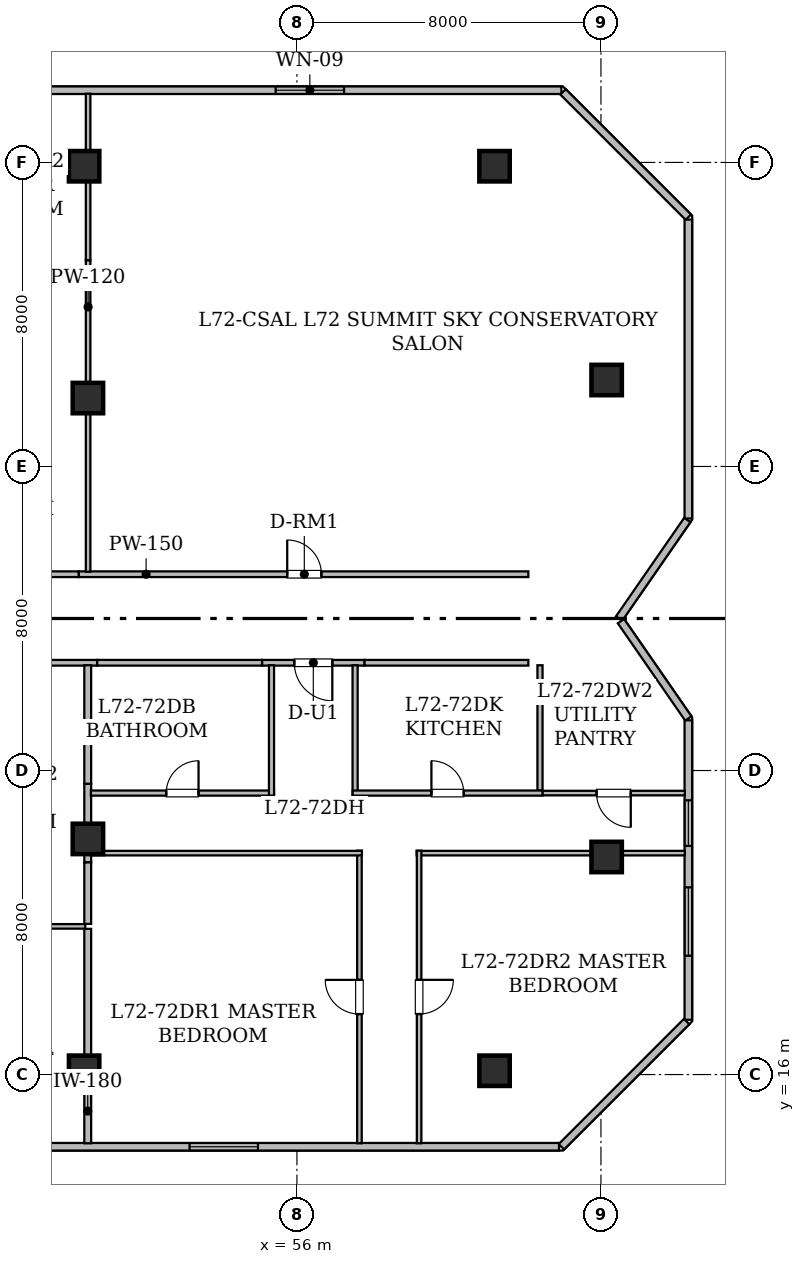
"""IFC4 building model, lengths in metres.
Left out: names, types, materials, properties, quantities, classifications, styles, units other than length and angle.
Written with IfcOpenShell. Run it as: python <this file> out.ifc"""

import sys

from ifc_helpers import new_model, si_unit, direction, frame, frame_2d, origin, origin_2d, place, context, subcontext, project, spatial, rectangle, hollow_rectangle, extrude, element, fill, save


model = new_model("IFC4")
c1 = context("Model", 3, precision=1e-05, world=origin(), true_north=direction((0.0, 1.0)))
c2 = subcontext(c1, "Body", "Model", "MODEL_VIEW")
j1 = project(units=[si_unit("LENGTHUNIT", "METRE"), si_unit("PLANEANGLEUNIT", "RADIAN")], contexts=[c1])
p1 = place(None, origin())
s1 = spatial("IfcSite", under=j1, at=p1, CompositionType="ELEMENT")
p2 = place(p1, origin())
s2 = spatial("IfcBuilding", under=s1, at=p2, CompositionType="ELEMENT")
p3 = place(p2, frame((0.0, 0.0, 282.05)))
s3 = spatial("IfcBuildingStorey", under=s2, at=p3, CompositionType="ELEMENT", Elevation=282.05)
for number, where, z_axis, x_axis in (
    (1, (50.4, 16.1, 0.0), (0.0, 0.0, 1.0), (1.0, 0.0, 0.0)),
    (2, (61.2, 16.1, 0.0), (0.0, 0.0, 1.0), (1.0, 0.0, 0.0)),
    (3, (50.4, 39.9, 0.0), (0.0, 0.0, 1.0), (1.0, 0.0, 0.0)),
    (4, (61.2, 39.9, 0.0), (0.0, 0.0, 1.0), (1.0, 0.0, 0.0)),
    (5, (64.15, 21.725, 0.0), (0.0, 0.0, 1.0), (1.0, 0.0, 0.0)),
    (6, (64.15, 34.275, 0.0), (0.0, 0.0, 1.0), (1.0, 0.0, 0.0)),
):
    element("IfcColumn", number, at=place(p3, frame(where, z_axis=z_axis, x_axis=x_axis)), inside=s3, PredefinedType="COLUMN", context=c2, shape_type="SweptSolid", body=[
        extrude(hollow_rectangle(XDim=0.8, YDim=0.8, WallThickness=0.04, at=origin_2d()), origin(), (0.0, 0.0, 1.0), 4.175),
    ])
for number, where, z_axis, x_axis in (
    (7, (50.5, 22.2, 0.0), (0.0, 0.0, 1.0), (1.0, 0.0, 0.0)),
    (8, (50.5, 33.8, 0.0), (0.0, 0.0, 1.0), (1.0, 0.0, 0.0)),
):
    element("IfcColumn", number, at=place(p3, frame(where, z_axis=z_axis, x_axis=x_axis)), inside=s3, PredefinedType="COLUMN", context=c2, shape_type="SweptSolid", body=[
        extrude(hollow_rectangle(XDim=0.8, YDim=0.8, WallThickness=0.04, at=origin_2d()), origin(), (0.0, 0.0, 1.0), 4.2),
    ])
p4 = place(p3, frame((27.102, 41.9, 0.0), z_axis=(0.0, 0.0, 1.0), x_axis=(1.0, 0.0, 0.0)))
e9 = element("IfcWall", 9, at=p4, inside=s3, PredefinedType="STANDARD", context=c2, shape_type="SweptSolid", body=[
    extrude(rectangle(XDim=35.857, YDim=0.2, at=frame_2d((17.928, 0.0))), origin(), (0.0, 0.0, 1.0), 3.78),
])
p5 = place(p4, frame((28.338, 0.0, 0.85)))
e10 = element("IfcOpeningElement", 10, at=p5, cuts=e9, PredefinedType="OPENING", context=c2, shape_type="SweptSolid", body=[
    extrude(rectangle(XDim=1.8, YDim=0.92, at=frame_2d((0.9, 0.46))), frame((0.0, 0.11, 0.0), z_axis=(0.0, -1.0, 0.0), x_axis=(1.0, 0.0, 0.0)), (0.0, 0.0, 1.0), 0.22),
])
p6 = place(p4, frame((17.233, 0.0, 0.78)))
e11 = element("IfcOpeningElement", 11, at=p6, cuts=e9, PredefinedType="OPENING", context=c2, shape_type="SweptSolid", body=[
    extrude(rectangle(XDim=1.2, YDim=1.5, at=frame_2d((0.6, 0.75))), frame((0.0, 0.11, 0.0), z_axis=(0.0, -1.0, 0.0), x_axis=(1.0, 0.0, 0.0)), (0.0, 0.0, 1.0), 0.22),
])
p7 = place(p4, frame((20.108, 0.0, 0.85)))
e12 = element("IfcOpeningElement", 12, at=p7, cuts=e9, PredefinedType="OPENING", context=c2, shape_type="SweptSolid", body=[
    extrude(rectangle(XDim=1.8, YDim=0.92, at=frame_2d((0.9, 0.46))), frame((0.0, 0.11, 0.0), z_axis=(0.0, -1.0, 0.0), x_axis=(1.0, 0.0, 0.0)), (0.0, 0.0, 1.0), 0.22),
])
p8 = place(p3, frame((63.002, 41.857, 0.0), z_axis=(0.0, 0.0, 1.0), x_axis=(0.707132953363, -0.707080608041, 0.0)))
e13 = element("IfcWall", 13, at=p8, inside=s3, PredefinedType="STANDARD", context=c2, shape_type="SweptSolid", body=[
    extrude(rectangle(XDim=4.664, YDim=0.2, at=frame_2d((2.332, 0.0))), origin(), (0.0, 0.0, 1.0), 3.78),
])
p9 = place(p3, frame((66.3, 38.496, 0.0), z_axis=(0.0, 0.0, 1.0), x_axis=(0.0, -1.0, 0.0)))
e14 = element("IfcWall", 14, at=p9, inside=s3, PredefinedType="STANDARD", context=c2, shape_type="SweptSolid", body=[
    extrude(rectangle(XDim=7.865, YDim=0.2, at=frame_2d((3.933, 0.0))), origin(), (0.0, 0.0, 1.0), 3.78),
])
p10 = place(p3, frame((66.273, 30.592, 0.0), z_axis=(0.0, 0.0, 1.0), x_axis=(-0.569302587555, -0.822128070195, 0.0)))
e15 = element("IfcWall", 15, at=p10, inside=s3, PredefinedType="STANDARD", context=c2, shape_type="SweptSolid", body=[
    extrude(rectangle(XDim=3.153, YDim=0.2, at=frame_2d((1.576, 0.0))), origin(), (0.0, 0.0, 1.0), 3.78),
])
p11 = place(p3, frame((64.526, 27.931, 0.0), z_axis=(0.0, 0.0, 1.0), x_axis=(0.569311819154, -0.822121677473, 0.0)))
e16 = element("IfcWall", 16, at=p11, inside=s3, PredefinedType="STANDARD", context=c2, shape_type="SweptSolid", body=[
    extrude(rectangle(XDim=3.116, YDim=0.2, at=frame_2d((1.558, 0.0))), origin(), (0.0, 0.0, 1.0), 3.78),
])
p12 = place(p3, frame((66.3, 25.321, 0.0), z_axis=(0.0, 0.0, 1.0), x_axis=(0.0, -1.0, 0.0)))
e17 = element("IfcWall", 17, at=p12, inside=s3, PredefinedType="STANDARD", context=c2, shape_type="SweptSolid", body=[
    extrude(rectangle(XDim=7.88, YDim=0.2, at=frame_2d((3.94, 0.0))), origin(), (0.0, 0.0, 1.0), 3.78),
])
p13 = place(p12, frame((2.105, 0.0, 0.78)))
e18 = element("IfcOpeningElement", 18, at=p13, cuts=e17, PredefinedType="OPENING", context=c2, shape_type="SweptSolid", body=[
    extrude(rectangle(XDim=1.2, YDim=1.5, at=frame_2d((0.6, 0.75))), frame((0.0, 0.11, 0.0), z_axis=(0.0, -1.0, 0.0), x_axis=(1.0, 0.0, 0.0)), (0.0, 0.0, 1.0), 0.22),
])
p14 = place(p12, frame((4.395, 0.0, 0.85)))
e19 = element("IfcOpeningElement", 19, at=p14, cuts=e17, PredefinedType="OPENING", context=c2, shape_type="SweptSolid", body=[
    extrude(rectangle(XDim=1.8, YDim=0.92, at=frame_2d((0.9, 0.46))), frame((0.0, 0.11, 0.0), z_axis=(0.0, -1.0, 0.0), x_axis=(1.0, 0.0, 0.0)), (0.0, 0.0, 1.0), 0.22),
])
p15 = place(p3, frame((66.255, 17.396, 0.0), z_axis=(0.0, 0.0, 1.0), x_axis=(-0.707106781187, -0.707106781187, 0.0)))
e20 = element("IfcWall", 20, at=p15, inside=s3, PredefinedType="STANDARD", context=c2, shape_type="SweptSolid", body=[
    extrude(rectangle(XDim=4.661, YDim=0.2, at=frame_2d((2.331, 0.0))), origin(), (0.0, 0.0, 1.0), 3.78),
])
p16 = place(p3, frame((62.896, 14.1, 0.0), z_axis=(0.0, 0.0, 1.0), x_axis=(-1.0, 0.0, 0.0)))
e21 = element("IfcWall", 21, at=p16, inside=s3, PredefinedType="STANDARD", context=c2, shape_type="SweptSolid", body=[
    extrude(rectangle(XDim=35.793, YDim=0.2, at=frame_2d((17.896, 0.0))), origin(), (0.0, 0.0, 1.0), 3.78),
])
p17 = place(p16, frame((17.361, 0.0, 0.78)))
e22 = element("IfcOpeningElement", 22, at=p17, cuts=e21, PredefinedType="OPENING", context=c2, shape_type="SweptSolid", body=[
    extrude(rectangle(XDim=1.2, YDim=1.5, at=frame_2d((0.6, 0.75))), frame((0.0, 0.11, 0.0), z_axis=(0.0, -1.0, 0.0), x_axis=(1.0, 0.0, 0.0)), (0.0, 0.0, 1.0), 0.22),
])
p18 = place(p16, frame((13.886, 0.0, 0.85)))
e23 = element("IfcOpeningElement", 23, at=p18, cuts=e21, PredefinedType="OPENING", context=c2, shape_type="SweptSolid", body=[
    extrude(rectangle(XDim=1.8, YDim=0.92, at=frame_2d((0.9, 0.46))), frame((0.0, 0.11, 0.0), z_axis=(0.0, -1.0, 0.0), x_axis=(1.0, 0.0, 0.0)), (0.0, 0.0, 1.0), 0.22),
])
p19 = place(p16, frame((7.921, 0.0, 0.85)))
e24 = element("IfcOpeningElement", 24, at=p19, cuts=e21, PredefinedType="OPENING", context=c2, shape_type="SweptSolid", body=[
    extrude(rectangle(XDim=1.8, YDim=0.92, at=frame_2d((0.9, 0.46))), frame((0.0, 0.11, 0.0), z_axis=(0.0, -1.0, 0.0), x_axis=(1.0, 0.0, 0.0)), (0.0, 0.0, 1.0), 0.22),
])
p20 = place(p3, frame((50.256, 29.165, 0.0), z_axis=(0.0, 0.0, 1.0), x_axis=(1.0, 0.0, 0.0)))
e25 = element("IfcWall", 25, at=p20, inside=s3, PredefinedType="STANDARD", context=c2, shape_type="SweptSolid", body=[
    extrude(rectangle(XDim=11.834, YDim=0.15, at=frame_2d((5.917, 0.0))), origin(), (0.0, 0.0, 1.0), 2.22),
])
p21 = place(p20, frame((5.488, 0.0, 0.0)))
e26 = element("IfcOpeningElement", 26, at=p21, cuts=e25, PredefinedType="OPENING", context=c2, shape_type="SweptSolid", body=[
    extrude(rectangle(XDim=0.9, YDim=2.1, at=frame_2d((0.45, 1.05))), frame((0.0, 0.085, 0.0), z_axis=(0.0, -1.0, 0.0), x_axis=(1.0, 0.0, 0.0)), (0.0, 0.0, 1.0), 0.17),
])
p22 = place(p3, frame((50.744, 26.835, 0.0), z_axis=(0.0, 0.0, 1.0), x_axis=(-1.0, 0.0, 0.0)))
e27 = element("IfcWall", 27, at=p22, inside=s3, PredefinedType="STANDARD", context=c2, shape_type="SweptSolid", body=[
    extrude(rectangle(XDim=4.77, YDim=0.15, at=frame_2d((2.385, 0.0))), origin(), (0.0, 0.0, 1.0), 2.22),
])
p23 = place(p3, frame((57.78, 26.835, 0.0), z_axis=(0.0, 0.0, 1.0), x_axis=(-1.0, 0.0, 0.0)))
e28 = element("IfcWall", 28, at=p23, inside=s3, PredefinedType="STANDARD", context=c2, shape_type="SweptSolid", body=[
    extrude(rectangle(XDim=2.698, YDim=0.15, at=frame_2d((1.349, 0.0))), origin(), (0.0, 0.0, 1.0), 3.78),
])
p24 = place(p23, frame((0.849, 0.0, 0.0)))
e29 = element("IfcOpeningElement", 29, at=p24, cuts=e28, PredefinedType="OPENING", context=c2, shape_type="SweptSolid", body=[
    extrude(rectangle(XDim=1.0, YDim=2.15, at=frame_2d((0.5, 1.075))), frame((0.0, 0.085, 0.0), z_axis=(0.0, -1.0, 0.0), x_axis=(1.0, 0.0, 0.0)), (0.0, 0.0, 1.0), 0.17),
])
p25 = place(p3, frame((55.082, 26.835, 0.0), z_axis=(0.0, 0.0, 1.0), x_axis=(-1.0, 0.0, 0.0)))
e30 = element("IfcWall", 30, at=p25, inside=s3, PredefinedType="STANDARD", context=c2, shape_type="SweptSolid", body=[
    extrude(rectangle(XDim=4.338, YDim=0.15, at=frame_2d((2.169, 0.0))), origin(), (0.0, 0.0, 1.0), 2.22),
])
p26 = place(p3, frame((62.09, 26.835, 0.0), z_axis=(0.0, 0.0, 1.0), x_axis=(-1.0, 0.0, 0.0)))
e31 = element("IfcWall", 31, at=p26, inside=s3, PredefinedType="STANDARD", context=c2, shape_type="SweptSolid", body=[
    extrude(rectangle(XDim=4.31, YDim=0.15, at=frame_2d((2.155, 0.0))), origin(), (0.0, 0.0, 1.0), 3.78),
])
p27 = place(p3, frame((45.974, 29.165, 0.0), z_axis=(0.0, 0.0, 1.0), x_axis=(1.0, 0.0, 0.0)))
e32 = element("IfcWall", 32, at=p27, inside=s3, PredefinedType="STANDARD", context=c2, shape_type="SweptSolid", body=[
    extrude(rectangle(XDim=4.282, YDim=0.15, at=frame_2d((2.141, 0.0))), origin(), (0.0, 0.0, 1.0), 2.22),
])
p28 = place(p3, frame((50.505, 29.23, 0.0), z_axis=(0.0, 0.0, 1.0), x_axis=(0.0, 1.0, 0.0)))
e33 = element("IfcWall", 33, at=p28, inside=s3, PredefinedType="PARTITIONING", context=c2, shape_type="SweptSolid", body=[
    extrude(rectangle(XDim=8.198, YDim=0.12, at=frame_2d((4.099, 0.0))), origin(), (0.0, 0.0, 1.0), 2.22),
])
p29 = place(p3, frame((50.505, 37.428, 0.0), z_axis=(0.0, 0.0, 1.0), x_axis=(0.0, 1.0, 0.0)))
e34 = element("IfcWall", 34, at=p29, inside=s3, PredefinedType="PARTITIONING", context=c2, shape_type="SweptSolid", body=[
    extrude(rectangle(XDim=4.38, YDim=0.12, at=frame_2d((2.19, 0.0))), origin(), (0.0, 0.0, 1.0), 2.22),
])
p30 = place(p3, frame((45.779, 19.899, 0.0), z_axis=(0.0, 0.0, 1.0), x_axis=(1.0, 0.0, 0.0)))
e35 = element("IfcWall", 35, at=p30, inside=s3, PredefinedType="PARTITIONING", context=c2, shape_type="SweptSolid", body=[
    extrude(rectangle(XDim=4.651, YDim=0.12, at=frame_2d((2.325, 0.0))), origin(), (0.0, 0.0, 1.0), 2.837),
])
p31 = place(p3, frame((50.495, 19.834, 0.0), z_axis=(0.0, 0.0, 1.0), x_axis=(0.0, -1.0, 0.0)))
e36 = element("IfcWall", 36, at=p31, inside=s3, PredefinedType="STANDARD", context=c2, shape_type="SweptSolid", body=[
    extrude(rectangle(XDim=5.642, YDim=0.18, at=frame_2d((2.821, 0.0))), origin(), (0.0, 0.0, 1.0), 2.22),
])
p32 = place(p3, frame((50.495, 23.651, 0.0), z_axis=(0.0, 0.0, 1.0), x_axis=(0.0, -1.0, 0.0)))
e37 = element("IfcWall", 37, at=p32, inside=s3, PredefinedType="STANDARD", context=c2, shape_type="SweptSolid", body=[
    extrude(rectangle(XDim=2.069, YDim=0.18, at=frame_2d((1.034, 0.0))), origin(), (0.0, 0.0, 1.0), 2.22),
])
p33 = place(p3, frame((50.495, 26.77, 0.0), z_axis=(0.0, 0.0, 1.0), x_axis=(0.0, -1.0, 0.0)))
e38 = element("IfcWall", 38, at=p33, inside=s3, PredefinedType="STANDARD", context=c2, shape_type="SweptSolid", body=[
    extrude(rectangle(XDim=3.119, YDim=0.18, at=frame_2d((1.56, 0.0))), origin(), (0.0, 0.0, 1.0), 2.22),
])
p34 = place(p3, frame((50.495, 21.582, 0.0), z_axis=(0.0, 0.0, 1.0), x_axis=(0.0, -1.0, 0.0)))
e39 = element("IfcWall", 39, at=p34, inside=s3, PredefinedType="STANDARD", context=c2, shape_type="SweptSolid", body=[
    extrude(rectangle(XDim=1.618, YDim=0.18, at=frame_2d((0.809, 0.0))), origin(), (0.0, 0.0, 1.0), 2.837),
])
p35 = place(p3, frame((66.208, 23.406, 0.0), z_axis=(0.0, 0.0, 1.0), x_axis=(-1.0, 0.0, 0.0)))
e40 = element("IfcWall", 40, at=p35, inside=s3, PredefinedType="PARTITIONING", context=c2, shape_type="SweptSolid", body=[
    extrude(rectangle(XDim=3.747, YDim=0.12, at=frame_2d((1.874, 0.0))), origin(), (0.0, 0.0, 1.0), 2.22),
])
p36 = place(p35, frame((1.423, 0.0, 0.0)))
e41 = element("IfcOpeningElement", 41, at=p36, cuts=e40, PredefinedType="OPENING", context=c2, shape_type="SweptSolid", body=[
    extrude(rectangle(XDim=0.9, YDim=2.1, at=frame_2d((0.45, 1.05))), frame((0.0, 0.07, 0.0), z_axis=(0.0, -1.0, 0.0), x_axis=(1.0, 0.0, 0.0)), (0.0, 0.0, 1.0), 0.14),
])
p37 = place(p3, frame((62.396, 23.471, 0.0), z_axis=(0.0, 0.0, 1.0), x_axis=(0.0, 1.0, 0.0)))
e42 = element("IfcWall", 42, at=p37, inside=s3, PredefinedType="PARTITIONING", context=c2, shape_type="SweptSolid", body=[
    extrude(rectangle(XDim=3.299, YDim=0.135, at=frame_2d((1.649, 0.0))), origin(), (0.0, 0.0, 1.0), 2.22),
])
p38 = place(p3, frame((50.577, 23.406, 0.0), z_axis=(0.0, 0.0, 1.0), x_axis=(1.0, 0.0, 0.0)))
e43 = element("IfcWall", 43, at=p38, inside=s3, PredefinedType="PARTITIONING", context=c2, shape_type="SweptSolid", body=[
    extrude(rectangle(XDim=4.819, YDim=0.135, at=frame_2d((2.41, 0.0))), origin(), (0.0, 0.0, 1.0), 2.22),
])
p39 = place(p38, frame((1.984, 0.0, 0.0)))
e44 = element("IfcOpeningElement", 44, at=p39, cuts=e43, PredefinedType="OPENING", context=c2, shape_type="SweptSolid", body=[
    extrude(rectangle(XDim=0.85, YDim=2.1, at=frame_2d((0.425, 1.05))), frame((0.0, 0.077, 0.0), z_axis=(0.0, -1.0, 0.0), x_axis=(1.0, 0.0, 0.0)), (0.0, 0.0, 1.0), 0.155),
])
for number, where, z_axis, x_axis in (
    (45, (55.331, 23.341, 0.0), (0.0, 0.0, 1.0), (0.0, 1.0, 0.0)),
    (46, (57.531, 26.77, 0.0), (0.0, 0.0, 1.0), (0.0, -1.0, 0.0)),
):
    element("IfcWall", number, at=place(p3, frame(where, z_axis=z_axis, x_axis=x_axis)), inside=s3, PredefinedType="PARTITIONING", context=c2, shape_type="SweptSolid", body=[
        extrude(rectangle(XDim=3.429, YDim=0.135, at=frame_2d((1.714, 0.0))), origin(), (0.0, 0.0, 1.0), 3.78),
    ])
p40 = place(p3, frame((57.466, 23.406, 0.0), z_axis=(0.0, 0.0, 1.0), x_axis=(1.0, 0.0, 0.0)))
e47 = element("IfcWall", 47, at=p40, inside=s3, PredefinedType="PARTITIONING", context=c2, shape_type="SweptSolid", body=[
    extrude(rectangle(XDim=4.995, YDim=0.135, at=frame_2d((2.498, 0.0))), origin(), (0.0, 0.0, 1.0), 2.22),
])
p41 = place(p40, frame((2.073, 0.0, 0.0)))
e48 = element("IfcOpeningElement", 48, at=p41, cuts=e47, PredefinedType="OPENING", context=c2, shape_type="SweptSolid", body=[
    extrude(rectangle(XDim=0.85, YDim=2.1, at=frame_2d((0.425, 1.05))), frame((0.0, 0.077, 0.0), z_axis=(0.0, -1.0, 0.0), x_axis=(1.0, 0.0, 0.0)), (0.0, 0.0, 1.0), 0.155),
])
p42 = place(p3, frame((57.645, 14.192, 0.0), z_axis=(0.0, 0.0, 1.0), x_axis=(0.0, 1.0, 0.0)))
e49 = element("IfcWall", 49, at=p42, inside=s3, PredefinedType="PARTITIONING", context=c2, shape_type="SweptSolid", body=[
    extrude(rectangle(XDim=7.699, YDim=0.12, at=frame_2d((3.85, 0.0))), origin(), (0.0, 0.0, 1.0), 2.22),
])
p43 = place(p42, frame((3.399, 0.0, 0.0)))
e50 = element("IfcOpeningElement", 50, at=p43, cuts=e49, PredefinedType="OPENING", context=c2, shape_type="SweptSolid", body=[
    extrude(rectangle(XDim=0.9, YDim=2.1, at=frame_2d((0.45, 1.05))), frame((0.0, 0.07, 0.0), z_axis=(0.0, -1.0, 0.0), x_axis=(1.0, 0.0, 0.0)), (0.0, 0.0, 1.0), 0.14),
])
p44 = place(p3, frame((57.71, 21.826, 0.0), z_axis=(0.0, 0.0, 1.0), x_axis=(-1.0, 0.0, 0.0)))
e51 = element("IfcWall", 51, at=p44, inside=s3, PredefinedType="PARTITIONING", context=c2, shape_type="SweptSolid", body=[
    extrude(rectangle(XDim=7.133, YDim=0.12, at=frame_2d((3.566, 0.0))), origin(), (0.0, 0.0, 1.0), 2.22),
])
p45 = place(p3, frame((66.208, 21.826, 0.0), z_axis=(0.0, 0.0, 1.0), x_axis=(-1.0, 0.0, 0.0)))
e52 = element("IfcWall", 52, at=p45, inside=s3, PredefinedType="PARTITIONING", context=c2, shape_type="SweptSolid", body=[
    extrude(rectangle(XDim=7.058, YDim=0.12, at=frame_2d((3.529, 0.0))), origin(), (0.0, 0.0, 1.0), 2.22),
])
p46 = place(p3, frame((59.215, 21.891, 0.0), z_axis=(0.0, 0.0, 1.0), x_axis=(0.0, -1.0, 0.0)))
e53 = element("IfcWall", 53, at=p46, inside=s3, PredefinedType="PARTITIONING", context=c2, shape_type="SweptSolid", body=[
    extrude(rectangle(XDim=7.699, YDim=0.12, at=frame_2d((3.85, 0.0))), origin(), (0.0, 0.0, 1.0), 2.22),
])
p47 = place(p46, frame((3.399, 0.0, 0.0)))
e54 = element("IfcOpeningElement", 54, at=p47, cuts=e53, PredefinedType="OPENING", context=c2, shape_type="SweptSolid", body=[
    extrude(rectangle(XDim=0.9, YDim=2.1, at=frame_2d((0.45, 1.05))), frame((0.0, 0.07, 0.0), z_axis=(0.0, -1.0, 0.0), x_axis=(1.0, 0.0, 0.0)), (0.0, 0.0, 1.0), 0.14),
])
p48 = place(p3, frame((45.779, 37.184, 0.0), z_axis=(0.0, 0.0, 1.0), x_axis=(1.0, 0.0, 0.0)))
e55 = element("IfcWall", 55, at=p48, inside=s3, PredefinedType="PARTITIONING", context=c2, shape_type="SweptSolid", body=[
    extrude(rectangle(XDim=4.672, YDim=0.12, at=frame_2d((2.336, 0.0))), origin(), (0.0, 0.0, 1.0), 2.837),
])
p49 = place(p5, origin())
e56 = element("IfcWindow", 56, at=p49, inside=s3, PartitioningType="SINGLE_PANEL", PredefinedType="WINDOW", context=c2, shape_type="SweptSolid", body=[
    extrude(rectangle(XDim=1.8, YDim=0.92, at=frame_2d((0.9, 0.46))), frame((0.0, 0.03, 0.0), z_axis=(0.0, -1.0, 0.0), x_axis=(1.0, 0.0, 0.0)), (0.0, 0.0, 1.0), 0.06),
])
fill(e10, e56)
p50 = place(p13, origin())
e57 = element("IfcWindow", 57, at=p50, inside=s3, PartitioningType="SINGLE_PANEL", PredefinedType="WINDOW", context=c2, shape_type="SweptSolid", body=[
    extrude(rectangle(XDim=1.2, YDim=1.5, at=frame_2d((0.6, 0.75))), frame((0.0, 0.03, 0.0), z_axis=(0.0, -1.0, 0.0), x_axis=(1.0, 0.0, 0.0)), (0.0, 0.0, 1.0), 0.06),
])
fill(e18, e57)
p51 = place(p19, origin())
e58 = element("IfcWindow", 58, at=p51, inside=s3, PartitioningType="SINGLE_PANEL", PredefinedType="WINDOW", context=c2, shape_type="SweptSolid", body=[
    extrude(rectangle(XDim=1.8, YDim=0.92, at=frame_2d((0.9, 0.46))), frame((0.0, 0.03, 0.0), z_axis=(0.0, -1.0, 0.0), x_axis=(1.0, 0.0, 0.0)), (0.0, 0.0, 1.0), 0.06),
])
fill(e24, e58)
p52 = place(p14, origin())
e59 = element("IfcWindow", 59, at=p52, inside=s3, PartitioningType="SINGLE_PANEL", PredefinedType="WINDOW", context=c2, shape_type="SweptSolid", body=[
    extrude(rectangle(XDim=1.8, YDim=0.92, at=frame_2d((0.9, 0.46))), frame((0.0, 0.03, 0.0), z_axis=(0.0, -1.0, 0.0), x_axis=(1.0, 0.0, 0.0)), (0.0, 0.0, 1.0), 0.06),
])
fill(e19, e59)
p53 = place(p21, origin())
e60 = element("IfcDoor", 60, at=p53, inside=s3, OperationType="SINGLE_SWING_LEFT", PredefinedType="DOOR", context=c2, shape_type="SweptSolid", body=[
    extrude(rectangle(XDim=0.9, YDim=2.1, at=frame_2d((0.45, 1.05))), frame((0.0, 0.025, 0.0), z_axis=(0.0, -1.0, 0.0), x_axis=(1.0, 0.0, 0.0)), (0.0, 0.0, 1.0), 0.05),
])
fill(e26, e60)
p54 = place(p24, origin())
e61 = element("IfcDoor", 61, at=p54, inside=s3, OperationType="SINGLE_SWING_LEFT", PredefinedType="DOOR", context=c2, shape_type="SweptSolid", body=[
    extrude(rectangle(XDim=1.0, YDim=2.15, at=frame_2d((0.5, 1.075))), frame((0.0, 0.025, 0.0), z_axis=(0.0, -1.0, 0.0), x_axis=(1.0, 0.0, 0.0)), (0.0, 0.0, 1.0), 0.05),
])
fill(e29, e61)
p55 = place(p36, origin())
e62 = element("IfcDoor", 62, at=p55, inside=s3, OperationType="SINGLE_SWING_LEFT", PredefinedType="DOOR", context=c2, shape_type="SweptSolid", body=[
    extrude(rectangle(XDim=0.9, YDim=2.1, at=frame_2d((0.45, 1.05))), frame((0.0, 0.025, 0.0), z_axis=(0.0, -1.0, 0.0), x_axis=(1.0, 0.0, 0.0)), (0.0, 0.0, 1.0), 0.05),
])
fill(e41, e62)
p56 = place(p39, origin())
e63 = element("IfcDoor", 63, at=p56, inside=s3, OperationType="SINGLE_SWING_RIGHT", PredefinedType="DOOR", context=c2, shape_type="SweptSolid", body=[
    extrude(rectangle(XDim=0.85, YDim=2.1, at=frame_2d((0.425, 1.05))), frame((0.0, 0.025, 0.0), z_axis=(0.0, -1.0, 0.0), x_axis=(1.0, 0.0, 0.0)), (0.0, 0.0, 1.0), 0.05),
])
fill(e44, e63)
p57 = place(p41, origin())
e64 = element("IfcDoor", 64, at=p57, inside=s3, OperationType="SINGLE_SWING_LEFT", PredefinedType="DOOR", context=c2, shape_type="SweptSolid", body=[
    extrude(rectangle(XDim=0.85, YDim=2.1, at=frame_2d((0.425, 1.05))), frame((0.0, 0.025, 0.0), z_axis=(0.0, -1.0, 0.0), x_axis=(1.0, 0.0, 0.0)), (0.0, 0.0, 1.0), 0.05),
])
fill(e48, e64)
p58 = place(p43, origin())
e65 = element("IfcDoor", 65, at=p58, inside=s3, OperationType="SINGLE_SWING_RIGHT", PredefinedType="DOOR", context=c2, shape_type="SweptSolid", body=[
    extrude(rectangle(XDim=0.9, YDim=2.1, at=frame_2d((0.45, 1.05))), frame((0.0, 0.025, 0.0), z_axis=(0.0, -1.0, 0.0), x_axis=(1.0, 0.0, 0.0)), (0.0, 0.0, 1.0), 0.05),
])
fill(e50, e65)
p59 = place(p47, origin())
e66 = element("IfcDoor", 66, at=p59, inside=s3, OperationType="SINGLE_SWING_LEFT", PredefinedType="DOOR", context=c2, shape_type="SweptSolid", body=[
    extrude(rectangle(XDim=0.9, YDim=2.1, at=frame_2d((0.45, 1.05))), frame((0.0, 0.025, 0.0), z_axis=(0.0, -1.0, 0.0), x_axis=(1.0, 0.0, 0.0)), (0.0, 0.0, 1.0), 0.05),
])
fill(e54, e66)
save(model, sys.argv[1])
